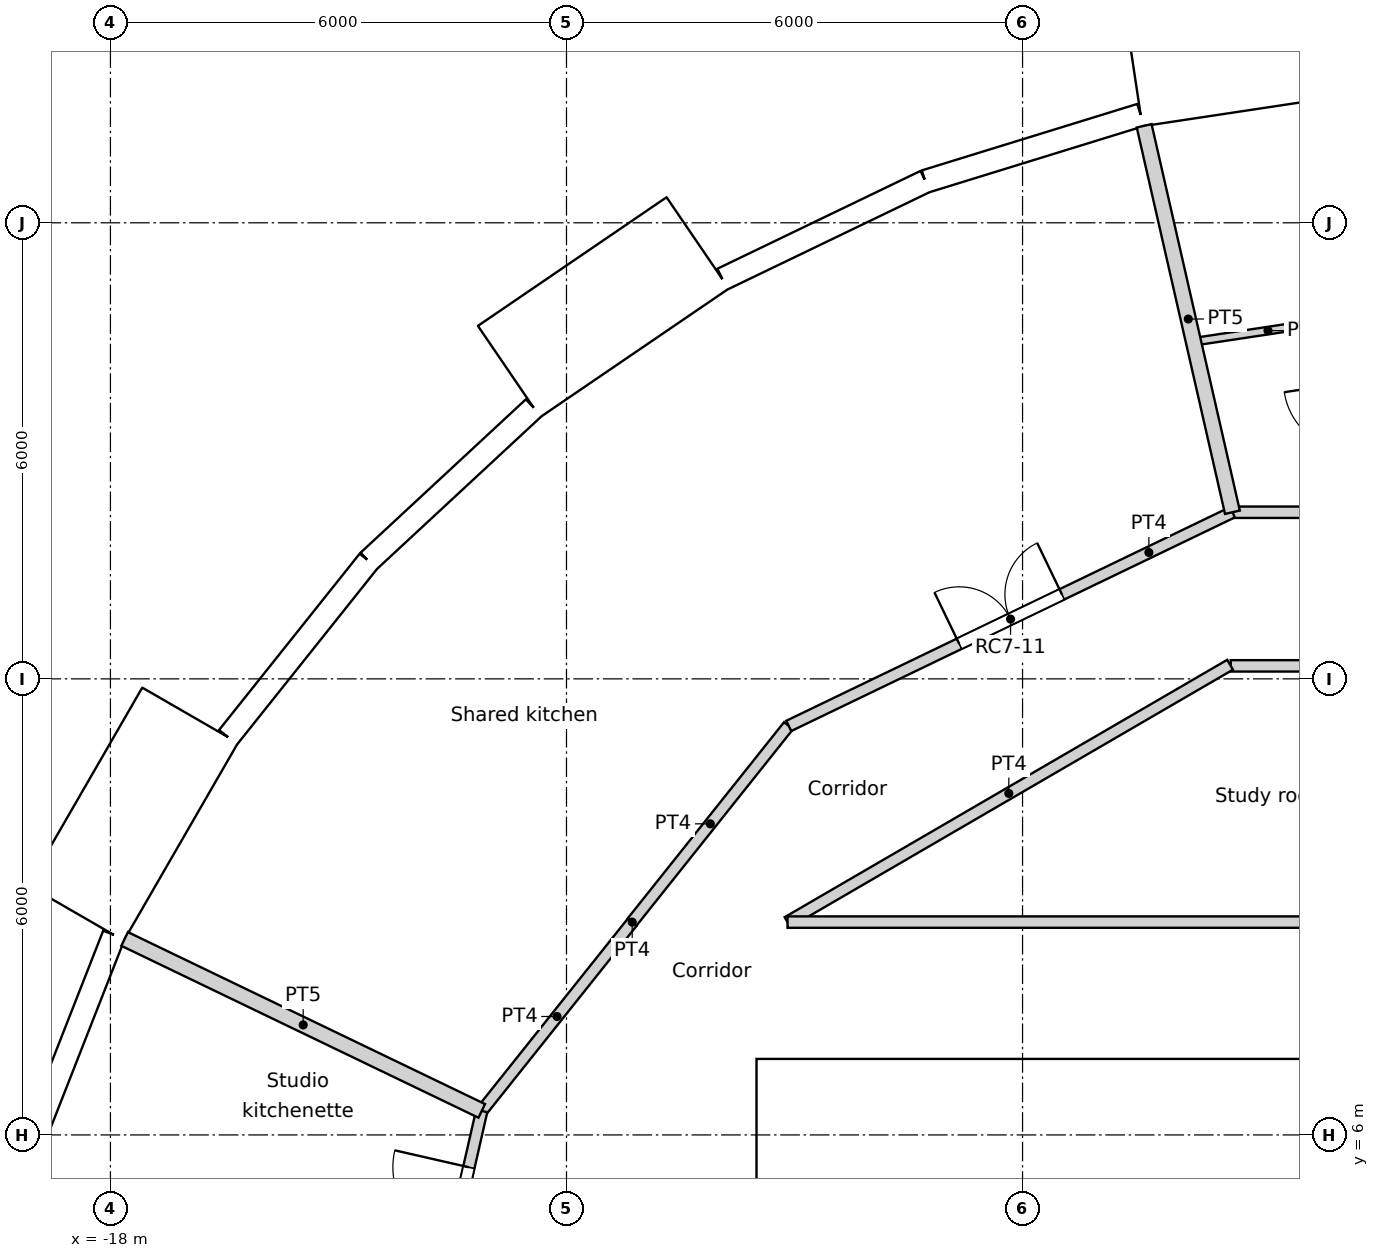
"""IFC4 building model, lengths in metres.
Left out: names, types, materials, properties, quantities, classifications, styles, units other than length and angle.
Written with IfcOpenShell. Run it as: python <this file> out.ifc"""

import sys

from ifc_helpers import new_model, si_unit, direction, frame, frame_2d, origin, origin_2d, place, context, subcontext, project, spatial, rectangle, circle, extrude, element, fill, save


model = new_model("IFC4")
c1 = context("Model", 3, precision=1e-05, world=origin(), true_north=direction((0.0, 1.0)))
c2 = subcontext(c1, "Body", "Model", "MODEL_VIEW")
j1 = project(units=[si_unit("LENGTHUNIT", "METRE"), si_unit("PLANEANGLEUNIT", "RADIAN")], contexts=[c1])
p1 = place(None, origin())
s1 = spatial("IfcSite", under=j1, at=p1, CompositionType="ELEMENT")
p2 = place(p1, origin())
s2 = spatial("IfcBuilding", under=s1, at=p2, CompositionType="ELEMENT")
p3 = place(p2, frame((0.0, 0.0, 294.6)))
s3 = spatial("IfcBuildingStorey", under=s2, at=p3, CompositionType="ELEMENT", Elevation=294.6)
for number, where, z_axis, x_axis in (
    (1, (-4.188, 18.35, 0.0), (0.0, 0.0, 1.0), (1.0, 0.0, 0.0)),
    (2, (-9.411, 16.301, 0.0), (0.0, 0.0, 1.0), (1.0, 0.0, 0.0)),
    (3, (-13.798, 12.802, 0.0), (0.0, 0.0, 1.0), (1.0, 0.0, 0.0)),
    (4, (-16.958, 8.167, 0.0), (0.0, 0.0, 1.0), (1.0, 0.0, 0.0)),
):
    element("IfcColumn", number, at=place(p3, frame(where, z_axis=z_axis, x_axis=x_axis)), inside=s3, PredefinedType="COLUMN", context=c2, shape_type="SweptSolid", body=[
        extrude(circle(Radius=0.45, at=origin_2d()), origin(), (0.0, 0.0, 1.0), 3.6),
    ])
p4 = place(p3, frame((-1.563, 20.436, -0.35), z_axis=(0.0, 0.0, 1.0), x_axis=(-0.988836445254, -0.149004981587, 0.0)))
e5 = element("IfcWall", 5, at=p4, inside=s3, PredefinedType="ELEMENTEDWALL", context=c2, shape_type="SweptSolid", body=[
    extrude(rectangle(XDim=3.0, YDim=1.45, at=frame_2d((1.5, 0.0))), origin(), (0.0, 0.0, 1.0), 3.6),
])
p5 = place(p4, frame((1.5, 0.0, 1.9)))
e6 = element("IfcOpeningElement", 6, at=p5, cuts=e5, PredefinedType="OPENING", context=c2, shape_type="SweptSolid", body=[
    extrude(circle(Radius=0.9, at=origin_2d()), frame((0.0, 0.735, 0.0), z_axis=(0.0, -1.0, 0.0), x_axis=(1.0, 0.0, 0.0)), (0.0, 0.0, 1.0), 1.47),
])
p6 = place(p3, frame((-4.448, 19.418, 0.0), z_axis=(0.0, 0.0, 1.0), x_axis=(-0.95558635705, -0.294711238707, 0.0)))
e7 = element("IfcWall", 7, at=p6, inside=s3, PredefinedType="SOLIDWALL", context=c2, shape_type="SweptSolid", body=[
    extrude(rectangle(XDim=2.962, YDim=0.3, at=frame_2d((1.481, 0.0))), origin(), (0.0, 0.0, 1.0), 3.25),
])
p7 = place(p6, frame((1.481, 0.0, 1.55)))
e8 = element("IfcOpeningElement", 8, at=p7, cuts=e7, PredefinedType="OPENING", context=c2, shape_type="SweptSolid", body=[
    extrude(circle(Radius=0.9, at=origin_2d()), frame((0.0, 0.16, 0.0), z_axis=(0.0, -1.0, 0.0), x_axis=(1.0, 0.0, 0.0)), (0.0, 0.0, 1.0), 0.32),
])
p8 = place(p3, frame((-7.278, 18.545, 0.0), z_axis=(0.0, 0.0, 1.0), x_axis=(-0.900939615635, -0.433944476838, 0.0)))
e9 = element("IfcWall", 9, at=p8, inside=s3, PredefinedType="SOLIDWALL", context=c2, shape_type="SweptSolid", body=[
    extrude(rectangle(XDim=2.962, YDim=0.3, at=frame_2d((1.481, 0.0))), origin(), (0.0, 0.0, 1.0), 3.25),
])
p9 = place(p8, frame((1.481, 0.0, 1.55)))
e10 = element("IfcOpeningElement", 10, at=p9, cuts=e9, PredefinedType="OPENING", context=c2, shape_type="SweptSolid", body=[
    extrude(circle(Radius=0.9, at=origin_2d()), frame((0.0, 0.16, 0.0), z_axis=(0.0, -1.0, 0.0), x_axis=(1.0, 0.0, 0.0)), (0.0, 0.0, 1.0), 0.32),
])
p10 = place(p3, frame((-10.275, 17.734, -0.35), z_axis=(0.0, 0.0, 1.0), x_axis=(-0.826246281157, -0.563309047392, 0.0)))
e11 = element("IfcWall", 11, at=p10, inside=s3, PredefinedType="ELEMENTEDWALL", context=c2, shape_type="SweptSolid", body=[
    extrude(rectangle(XDim=3.0, YDim=1.45, at=frame_2d((1.5, 0.0))), origin(), (0.0, 0.0, 1.0), 3.6),
])
p11 = place(p10, frame((1.5, 0.0, 1.9)))
e12 = element("IfcOpeningElement", 12, at=p11, cuts=e11, PredefinedType="OPENING", context=c2, shape_type="SweptSolid", body=[
    extrude(circle(Radius=0.9, at=origin_2d()), frame((0.0, 0.735, 0.0), z_axis=(0.0, -1.0, 0.0), x_axis=(1.0, 0.0, 0.0)), (0.0, 0.0, 1.0), 1.47),
])
p12 = place(p3, frame((-12.432, 15.565, 0.0), z_axis=(0.0, 0.0, 1.0), x_axis=(-0.733066412643, -0.680157066165, 0.0)))
e13 = element("IfcWall", 13, at=p12, inside=s3, PredefinedType="SOLIDWALL", context=c2, shape_type="SweptSolid", body=[
    extrude(rectangle(XDim=2.962, YDim=0.3, at=frame_2d((1.481, 0.0))), origin(), (0.0, 0.0, 1.0), 3.25),
])
p13 = place(p12, frame((1.481, 0.0, 1.55)))
e14 = element("IfcOpeningElement", 14, at=p13, cuts=e13, PredefinedType="OPENING", context=c2, shape_type="SweptSolid", body=[
    extrude(circle(Radius=0.9, at=origin_2d()), frame((0.0, 0.16, 0.0), z_axis=(0.0, -1.0, 0.0), x_axis=(1.0, 0.0, 0.0)), (0.0, 0.0, 1.0), 0.32),
])
p14 = place(p3, frame((-14.604, 13.55, 0.0), z_axis=(0.0, 0.0, 1.0), x_axis=(-0.623498236992, -0.781824755599, 0.0)))
e15 = element("IfcWall", 15, at=p14, inside=s3, PredefinedType="SOLIDWALL", context=c2, shape_type="SweptSolid", body=[
    extrude(rectangle(XDim=2.962, YDim=0.3, at=frame_2d((1.481, 0.0))), origin(), (0.0, 0.0, 1.0), 3.25),
])
p15 = place(p14, frame((1.481, 0.0, 1.55)))
e16 = element("IfcOpeningElement", 16, at=p15, cuts=e15, PredefinedType="OPENING", context=c2, shape_type="SweptSolid", body=[
    extrude(circle(Radius=0.9, at=origin_2d()), frame((0.0, 0.16, 0.0), z_axis=(0.0, -1.0, 0.0), x_axis=(1.0, 0.0, 0.0)), (0.0, 0.0, 1.0), 0.32),
])
p16 = place(p3, frame((-16.952, 11.52, -0.35), z_axis=(0.0, 0.0, 1.0), x_axis=(-0.499990139034, -0.866031096941, 0.0)))
e17 = element("IfcWall", 17, at=p16, inside=s3, PredefinedType="ELEMENTEDWALL", context=c2, shape_type="SweptSolid", body=[
    extrude(rectangle(XDim=3.0, YDim=1.45, at=frame_2d((1.5, 0.0))), origin(), (0.0, 0.0, 1.0), 3.6),
])
p17 = place(p16, frame((1.5, 0.0, 1.9)))
e18 = element("IfcOpeningElement", 18, at=p17, cuts=e17, PredefinedType="OPENING", context=c2, shape_type="SweptSolid", body=[
    extrude(circle(Radius=0.9, at=origin_2d()), frame((0.0, 0.735, 0.0), z_axis=(0.0, -1.0, 0.0), x_axis=(1.0, 0.0, 0.0)), (0.0, 0.0, 1.0), 1.47),
])
p18 = place(p3, frame((-17.955, 8.629, 0.0), z_axis=(0.0, 0.0, 1.0), x_axis=(-0.36530043032, -0.930889679612, 0.0)))
e19 = element("IfcWall", 19, at=p18, inside=s3, PredefinedType="SOLIDWALL", context=c2, shape_type="SweptSolid", body=[
    extrude(rectangle(XDim=2.962, YDim=0.3, at=frame_2d((1.481, 0.0))), origin(), (0.0, 0.0, 1.0), 3.25),
])
p19 = place(p18, frame((1.481, 0.0, 1.55)))
e20 = element("IfcOpeningElement", 20, at=p19, cuts=e19, PredefinedType="OPENING", context=c2, shape_type="SweptSolid", body=[
    extrude(circle(Radius=0.9, at=origin_2d()), frame((0.0, 0.16, 0.0), z_axis=(0.0, -1.0, 0.0), x_axis=(1.0, 0.0, 0.0)), (0.0, 0.0, 1.0), 0.32),
])
p20 = place(p3, frame((-9.5, 6.7, 0.0), z_axis=(0.0, 0.0, 1.0), x_axis=(1.0, 0.0, 0.0)))
e21 = element("IfcWall", 21, at=p20, inside=s3, PredefinedType="SOLIDWALL", context=c2, shape_type="SweptSolid", body=[
    extrude(rectangle(XDim=19.0, YDim=0.6, at=frame_2d((9.5, 0.0))), origin(), (0.0, 0.0, 1.0), 3.6),
])
p21 = place(p20, frame((5.35, 0.0, 0.0)))
e22 = element("IfcOpeningElement", 22, at=p21, cuts=e21, PredefinedType="OPENING", context=c2, shape_type="SweptSolid", body=[
    extrude(rectangle(XDim=1.7, YDim=2.1, at=frame_2d((0.85, 1.05))), frame((0.0, 0.3, 0.0), z_axis=(0.0, -1.0, 0.0), x_axis=(1.0, 0.0, 0.0)), (0.0, 0.0, 1.0), 0.6),
])
p22 = place(p3, frame((-9.2, -6.4, 0.0), z_axis=(0.0, 0.0, 1.0), x_axis=(0.0, 1.0, 0.0)))
e23 = element("IfcWall", 23, at=p22, inside=s3, PredefinedType="SOLIDWALL", context=c2, shape_type="SweptSolid", body=[
    extrude(rectangle(XDim=12.8, YDim=0.6, at=frame_2d((6.4, 0.0))), origin(), (0.0, 0.0, 1.0), 3.6),
])
p23 = place(p3, frame((-2.25, 3.25, 0.0), z_axis=(0.0, 0.0, 1.0), x_axis=(0.0, 1.0, 0.0)))
e24 = element("IfcWall", 24, at=p23, inside=s3, PredefinedType="SOLIDWALL", context=c2, shape_type="SweptSolid", body=[
    extrude(rectangle(XDim=3.15, YDim=0.3, at=frame_2d((1.575, 0.0))), origin(), (0.0, 0.0, 1.0), 3.25),
])
p24 = place(p3, frame((-9.092, 8.8, 0.0), z_axis=(0.0, 0.0, 1.0), x_axis=(0.864470922103, 0.502682827277, 0.0)))
e25 = element("IfcWall", 25, at=p24, inside=s3, PredefinedType="PARTITIONING", context=c2, shape_type="SweptSolid", body=[
    extrude(rectangle(XDim=6.735, YDim=0.15, at=frame_2d((3.368, 0.0))), origin(), (0.0, 0.0, 1.0), 3.25),
])
p25 = place(p3, frame((-9.092, 8.8, 0.0), z_axis=(0.0, 0.0, 1.0), x_axis=(1.0, 0.0, 0.0)))
e26 = element("IfcWall", 26, at=p25, inside=s3, PredefinedType="PARTITIONING", context=c2, shape_type="SweptSolid", body=[
    extrude(rectangle(XDim=18.193, YDim=0.15, at=frame_2d((9.096, 0.0))), origin(), (0.0, 0.0, 1.0), 3.25),
])
p26 = place(p25, frame((8.592, 0.0, 0.0)))
e27 = element("IfcOpeningElement", 27, at=p26, cuts=e26, PredefinedType="OPENING", context=c2, shape_type="SweptSolid", body=[
    extrude(rectangle(XDim=1.0, YDim=2.04, at=frame_2d((0.5, 1.02))), frame((0.0, 0.075, 0.0), z_axis=(0.0, -1.0, 0.0), x_axis=(1.0, 0.0, 0.0)), (0.0, 0.0, 1.0), 0.15),
])
p27 = place(p3, frame((-11.134, 8.8, 0.0), z_axis=(0.0, 0.0, 1.0), x_axis=(-1.0, 0.0, 0.0)))
e28 = element("IfcWall", 28, at=p27, inside=s3, PredefinedType="PARTITIONING", context=c2, shape_type="SweptSolid", body=[
    extrude(rectangle(XDim=0.003, YDim=0.15, at=frame_2d((0.001, 0.0))), origin(), (0.0, 0.0, 1.0), 3.25),
])
p28 = place(p3, frame((-11.136, 8.802, 0.0), z_axis=(0.0, 0.0, 1.0), x_axis=(0.623151397235, 0.782101231379, 0.0)))
e29 = element("IfcWall", 29, at=p28, inside=s3, PredefinedType="PARTITIONING", context=c2, shape_type="SweptSolid", body=[
    extrude(rectangle(XDim=3.301, YDim=0.15, at=frame_2d((1.65, 0.0))), origin(), (0.0, 0.0, 1.0), 3.25),
])
p29 = place(p3, frame((-3.261, 12.171, 0.0), z_axis=(0.0, 0.0, 1.0), x_axis=(1.0, 0.0, 0.0)))
e30 = element("IfcWall", 30, at=p29, inside=s3, PredefinedType="PARTITIONING", context=c2, shape_type="SweptSolid", body=[
    extrude(rectangle(XDim=6.522, YDim=0.15, at=frame_2d((3.261, 0.0))), origin(), (0.0, 0.0, 1.0), 3.25),
])
p30 = place(p3, frame((-3.239, 14.192, 0.0), z_axis=(0.0, 0.0, 1.0), x_axis=(1.0, 0.0, 0.0)))
e31 = element("IfcWall", 31, at=p30, inside=s3, PredefinedType="PARTITIONING", context=c2, shape_type="SweptSolid", body=[
    extrude(rectangle(XDim=6.478, YDim=0.15, at=frame_2d((3.239, 0.0))), origin(), (0.0, 0.0, 1.0), 3.25),
])
p31 = place(p30, frame((4.888, 0.0, 0.0)))
e32 = element("IfcOpeningElement", 32, at=p31, cuts=e31, PredefinedType="OPENING", context=c2, shape_type="SweptSolid", body=[
    extrude(rectangle(XDim=1.0, YDim=2.1, at=frame_2d((0.5, 1.05))), frame((0.0, 0.075, 0.0), z_axis=(0.0, -1.0, 0.0), x_axis=(1.0, 0.0, 0.0)), (0.0, 0.0, 1.0), 0.15),
])
p32 = place(p30, frame((2.567, 0.0, 0.0)))
e33 = element("IfcOpeningElement", 33, at=p32, cuts=e31, PredefinedType="OPENING", context=c2, shape_type="SweptSolid", body=[
    extrude(rectangle(XDim=1.0, YDim=2.1, at=frame_2d((0.5, 1.05))), frame((0.0, 0.075, 0.0), z_axis=(0.0, -1.0, 0.0), x_axis=(1.0, 0.0, 0.0)), (0.0, 0.0, 1.0), 0.15),
])
p33 = place(p3, frame((-9.076, 11.381, 0.0), z_axis=(0.0, 0.0, 1.0), x_axis=(0.900976027191, 0.433868872388, 0.0)))
e34 = element("IfcWall", 34, at=p33, inside=s3, PredefinedType="PARTITIONING", context=c2, shape_type="SweptSolid", body=[
    extrude(rectangle(XDim=6.479, YDim=0.15, at=frame_2d((3.239, 0.0))), origin(), (0.0, 0.0, 1.0), 3.25),
])
p34 = place(p33, frame((2.489, 0.0, 0.0)))
e35 = element("IfcOpeningElement", 35, at=p34, cuts=e34, PredefinedType="OPENING", context=c2, shape_type="SweptSolid", body=[
    extrude(rectangle(XDim=1.5, YDim=2.1, at=frame_2d((0.75, 1.05))), frame((0.0, 0.075, 0.0), z_axis=(0.0, -1.0, 0.0), x_axis=(1.0, 0.0, 0.0)), (0.0, 0.0, 1.0), 0.15),
])
p35 = place(p3, frame((-13.115, 6.316, 0.0), z_axis=(0.0, 0.0, 1.0), x_axis=(0.623476099415, 0.781842409606, 0.0)))
e36 = element("IfcWall", 36, at=p35, inside=s3, PredefinedType="PARTITIONING", context=c2, shape_type="SweptSolid", body=[
    extrude(rectangle(XDim=3.177, YDim=0.15, at=frame_2d((1.589, 0.0))), origin(), (0.0, 0.0, 1.0), 3.25),
])
p36 = place(p3, frame((-14.557, 0.0, 0.0), z_axis=(0.0, 0.0, 1.0), x_axis=(0.222533159771, 0.974925121639, 0.0)))
e37 = element("IfcWall", 37, at=p36, inside=s3, PredefinedType="PARTITIONING", context=c2, shape_type="SweptSolid", body=[
    extrude(rectangle(XDim=6.478, YDim=0.15, at=frame_2d((3.239, 0.0))), origin(), (0.0, 0.0, 1.0), 3.25),
])
p37 = place(p36, frame((4.718, 0.0, 0.0)))
e38 = element("IfcOpeningElement", 38, at=p37, cuts=e37, PredefinedType="OPENING", context=c2, shape_type="SweptSolid", body=[
    extrude(rectangle(XDim=1.0, YDim=2.1, at=frame_2d((0.5, 1.05))), frame((0.0, 0.075, 0.0), z_axis=(0.0, -1.0, 0.0), x_axis=(1.0, 0.0, 0.0)), (0.0, 0.0, 1.0), 0.15),
])
p38 = place(p3, frame((-3.751, 16.434, 0.0), z_axis=(0.0, 0.0, 1.0), x_axis=(0.988867580828, 0.148798210967, 0.0)))
e39 = element("IfcWall", 39, at=p38, inside=s3, PredefinedType="PARTITIONING", context=c2, shape_type="SweptSolid", body=[
    extrude(rectangle(XDim=1.982, YDim=0.1, at=frame_2d((0.991, 0.0))), origin(), (0.0, 0.0, 1.0), 3.25),
])
p39 = place(p3, frame((-4.4, 19.276, 0.0), z_axis=(0.0, 0.0, 1.0), x_axis=(0.222612505682, -0.974907007008, 0.0)))
e40 = element("IfcWall", 40, at=p39, inside=s3, PredefinedType="PARTITIONING", context=c2, shape_type="SweptSolid", body=[
    extrude(rectangle(XDim=5.215, YDim=0.2, at=frame_2d((2.607, 0.0))), origin(), (0.0, 0.0, 1.0), 3.25),
])
p40 = place(p3, frame((-17.813, 8.578, 0.0), z_axis=(0.0, 0.0, 1.0), x_axis=(0.901022681876, -0.433771975518, 0.0)))
e41 = element("IfcWall", 41, at=p40, inside=s3, PredefinedType="PARTITIONING", context=c2, shape_type="SweptSolid", body=[
    extrude(rectangle(XDim=5.214, YDim=0.2, at=frame_2d((2.607, 0.0))), origin(), (0.0, 0.0, 1.0), 3.25),
])
p41 = place(p5, origin())
e42 = element("IfcWindow", 42, at=p41, inside=s3, PartitioningType="SINGLE_PANEL", PredefinedType="WINDOW", context=c2, shape_type="SweptSolid", body=[
    extrude(circle(Radius=0.9, at=origin_2d()), frame((0.0, 0.695, 0.0), z_axis=(0.0, -1.0, 0.0), x_axis=(1.0, 0.0, 0.0)), (0.0, 0.0, 1.0), 0.1),
])
fill(e6, e42)
p42 = place(p7, origin())
e43 = element("IfcWindow", 43, at=p42, inside=s3, PartitioningType="SINGLE_PANEL", PredefinedType="WINDOW", context=c2, shape_type="SweptSolid", body=[
    extrude(circle(Radius=0.9, at=origin_2d()), frame((0.0, 0.12, 0.0), z_axis=(0.0, -1.0, 0.0), x_axis=(1.0, 0.0, 0.0)), (0.0, 0.0, 1.0), 0.1),
])
fill(e8, e43)
p43 = place(p9, origin())
e44 = element("IfcWindow", 44, at=p43, inside=s3, PartitioningType="SINGLE_PANEL", PredefinedType="WINDOW", context=c2, shape_type="SweptSolid", body=[
    extrude(circle(Radius=0.9, at=origin_2d()), frame((0.0, 0.12, 0.0), z_axis=(0.0, -1.0, 0.0), x_axis=(1.0, 0.0, 0.0)), (0.0, 0.0, 1.0), 0.1),
])
fill(e10, e44)
p44 = place(p11, origin())
e45 = element("IfcWindow", 45, at=p44, inside=s3, PartitioningType="SINGLE_PANEL", PredefinedType="WINDOW", context=c2, shape_type="SweptSolid", body=[
    extrude(circle(Radius=0.9, at=origin_2d()), frame((0.0, 0.695, 0.0), z_axis=(0.0, -1.0, 0.0), x_axis=(1.0, 0.0, 0.0)), (0.0, 0.0, 1.0), 0.1),
])
fill(e12, e45)
p45 = place(p13, origin())
e46 = element("IfcWindow", 46, at=p45, inside=s3, PartitioningType="SINGLE_PANEL", PredefinedType="WINDOW", context=c2, shape_type="SweptSolid", body=[
    extrude(circle(Radius=0.9, at=origin_2d()), frame((0.0, 0.12, 0.0), z_axis=(0.0, -1.0, 0.0), x_axis=(1.0, 0.0, 0.0)), (0.0, 0.0, 1.0), 0.1),
])
fill(e14, e46)
p46 = place(p15, origin())
e47 = element("IfcWindow", 47, at=p46, inside=s3, PartitioningType="SINGLE_PANEL", PredefinedType="WINDOW", context=c2, shape_type="SweptSolid", body=[
    extrude(circle(Radius=0.9, at=origin_2d()), frame((0.0, 0.12, 0.0), z_axis=(0.0, -1.0, 0.0), x_axis=(1.0, 0.0, 0.0)), (0.0, 0.0, 1.0), 0.1),
])
fill(e16, e47)
p47 = place(p17, origin())
e48 = element("IfcWindow", 48, at=p47, inside=s3, PartitioningType="SINGLE_PANEL", PredefinedType="WINDOW", context=c2, shape_type="SweptSolid", body=[
    extrude(circle(Radius=0.9, at=origin_2d()), frame((0.0, 0.695, 0.0), z_axis=(0.0, -1.0, 0.0), x_axis=(1.0, 0.0, 0.0)), (0.0, 0.0, 1.0), 0.1),
])
fill(e18, e48)
p48 = place(p19, origin())
e49 = element("IfcWindow", 49, at=p48, inside=s3, PartitioningType="SINGLE_PANEL", PredefinedType="WINDOW", context=c2, shape_type="SweptSolid", body=[
    extrude(circle(Radius=0.9, at=origin_2d()), frame((0.0, 0.12, 0.0), z_axis=(0.0, -1.0, 0.0), x_axis=(1.0, 0.0, 0.0)), (0.0, 0.0, 1.0), 0.1),
])
fill(e20, e49)
p49 = place(p21, origin())
e50 = element("IfcDoor", 50, at=p49, inside=s3, OperationType="DOUBLE_DOOR_SINGLE_SWING", PredefinedType="DOOR", context=c2, shape_type="SweptSolid", body=[
    extrude(rectangle(XDim=1.7, YDim=2.1, at=frame_2d((0.85, 1.05))), frame((0.0, 0.025, 0.0), z_axis=(0.0, -1.0, 0.0), x_axis=(1.0, 0.0, 0.0)), (0.0, 0.0, 1.0), 0.05),
])
fill(e22, e50)
p50 = place(p34, origin())
e51 = element("IfcDoor", 51, at=p50, inside=s3, OperationType="DOUBLE_DOOR_SINGLE_SWING", PredefinedType="DOOR", context=c2, shape_type="SweptSolid", body=[
    extrude(rectangle(XDim=1.5, YDim=2.1, at=frame_2d((0.75, 1.05))), frame((0.0, 0.025, 0.0), z_axis=(0.0, -1.0, 0.0), x_axis=(1.0, 0.0, 0.0)), (0.0, 0.0, 1.0), 0.05),
])
fill(e35, e51)
p51 = place(p37, origin())
e52 = element("IfcDoor", 52, at=p51, inside=s3, OperationType="SINGLE_SWING_RIGHT", PredefinedType="DOOR", context=c2, shape_type="SweptSolid", body=[
    extrude(rectangle(XDim=1.0, YDim=2.1, at=frame_2d((0.5, 1.05))), frame((0.0, 0.025, 0.0), z_axis=(0.0, -1.0, 0.0), x_axis=(1.0, 0.0, 0.0)), (0.0, 0.0, 1.0), 0.05),
])
fill(e38, e52)
save(model, sys.argv[1])
